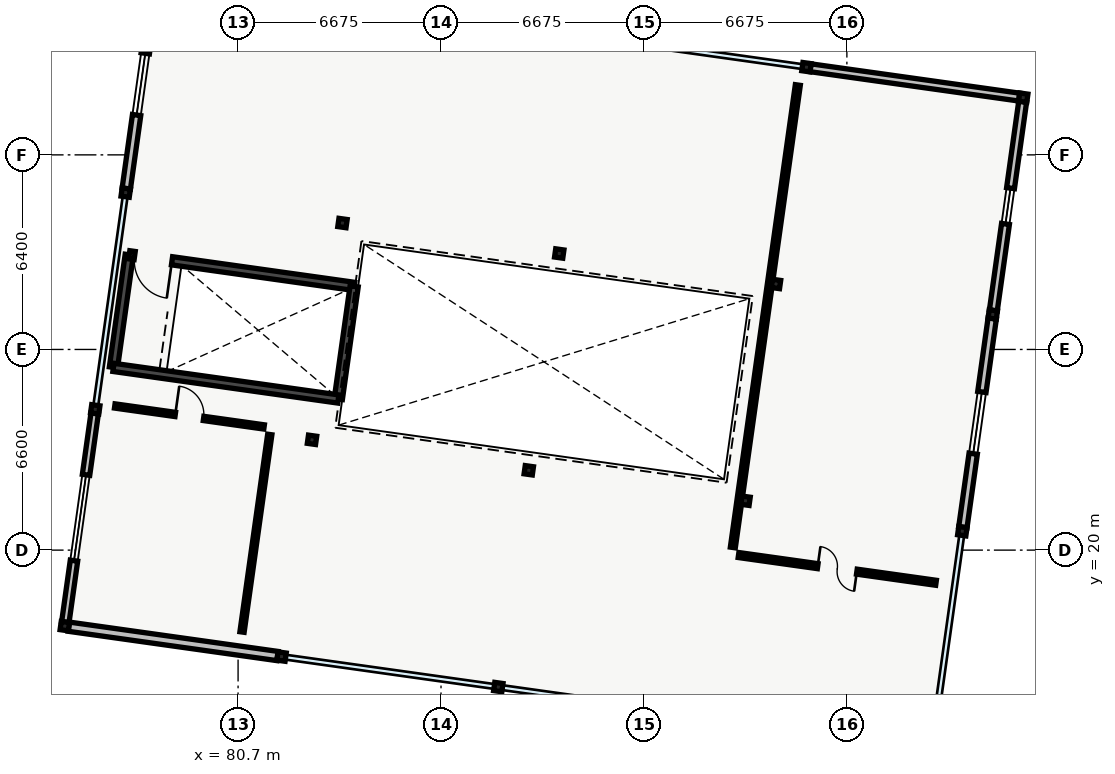
"""IFC4 building model, lengths in metres.
Left out: names, types, materials, properties, quantities, classifications, styles, units other than length and angle.
Written with IfcOpenShell. Run it as: python <this file> out.ifc"""

import sys

from ifc_helpers import new_model, si_unit, direction, frame, frame_2d, origin, origin_2d, place, context, subcontext, project, spatial, rectangle, hollow_circle, extrude, element, fill, save


model = new_model("IFC4")
c1 = context("Model", 3, precision=1e-05, world=origin(), true_north=direction((0.0, 1.0)))
c2 = subcontext(c1, "Body", "Model", "MODEL_VIEW")
j1 = project(units=[si_unit("LENGTHUNIT", "METRE"), si_unit("PLANEANGLEUNIT", "RADIAN")], contexts=[c1])
p1 = place(None, origin())
s1 = spatial("IfcSite", under=j1, at=p1, CompositionType="ELEMENT")
p2 = place(p1, origin())
s2 = spatial("IfcBuilding", under=s1, at=p2, CompositionType="ELEMENT")
p3 = place(p2, frame((0.0, 0.0, 9.6)))
s3 = spatial("IfcBuildingStorey", under=s2, at=p3, CompositionType="ELEMENT", Elevation=9.6)
for number, where, z_axis, x_axis in (
    (1, (75.0, 17.5, 0.0), (0.0, 0.0, 1.0), (0.99, -0.139, 0.0)),
    (2, (76.002, 24.63, 0.0), (0.0, 0.0, 1.0), (0.99, -0.139, 0.0)),
    (3, (77.004, 31.76, 0.0), (0.0, 0.0, 1.0), (0.99, -0.139, 0.0)),
    (4, (82.13, 16.498, 0.0), (0.0, 0.0, 1.0), (0.99, -0.139, 0.0)),
    (5, (83.132, 23.628, 0.0), (0.0, 0.0, 1.0), (0.99, -0.139, 0.0)),
    (6, (84.134, 30.758, 0.0), (0.0, 0.0, 1.0), (0.99, -0.139, 0.0)),
    (7, (89.26, 15.496, 0.0), (0.0, 0.0, 1.0), (0.99, -0.139, 0.0)),
    (8, (90.262, 22.626, 0.0), (0.0, 0.0, 1.0), (0.99, -0.139, 0.0)),
    (9, (91.264, 29.756, 0.0), (0.0, 0.0, 1.0), (0.99, -0.139, 0.0)),
    (10, (97.392, 21.624, 0.0), (0.0, 0.0, 1.0), (0.99, -0.139, 0.0)),
    (11, (98.394, 28.754, 0.0), (0.0, 0.0, 1.0), (0.99, -0.139, 0.0)),
    (12, (99.396, 35.884, 0.0), (0.0, 0.0, 1.0), (0.99, -0.139, 0.0)),
    (13, (104.522, 20.622, 0.0), (0.0, 0.0, 1.0), (0.99, -0.139, 0.0)),
    (14, (105.524, 27.752, 0.0), (0.0, 0.0, 1.0), (0.99, -0.139, 0.0)),
    (15, (106.526, 34.882, 0.0), (0.0, 0.0, 1.0), (0.99, -0.139, 0.0)),
):
    element("IfcColumn", number, at=place(p3, frame(where, z_axis=z_axis, x_axis=x_axis)), inside=s3, PredefinedType="COLUMN", context=c2, shape_type="SweptSolid", body=[
        extrude(hollow_circle(Radius=0.136, WallThickness=0.01, at=origin_2d()), origin(), (0.0, 0.0, 1.0), 4.325),
    ])
p4 = place(p3, frame((75.018, 17.63, 0.0), z_axis=(0.0, 0.0, 1.0), x_axis=(0.139154533409, 0.990270678063, 0.0)))
e16 = element("IfcWall", 16, at=p4, inside=s3, PredefinedType="STANDARD", context=c2, shape_type="SweptSolid", body=[
    extrude(rectangle(XDim=6.937, YDim=0.245, at=frame_2d((3.469, 0.0))), origin(), (0.0, 0.0, 1.0), 4.09),
])
p5 = place(p4, frame((2.043, 0.0, 0.95)))
e17 = element("IfcOpeningElement", 17, at=p5, cuts=e16, PredefinedType="OPENING", context=c2, shape_type="SweptSolid", body=[
    extrude(rectangle(XDim=2.85, YDim=1.5, at=frame_2d((1.425, 0.75))), frame((0.0, 0.123, 0.0), z_axis=(0.0, -1.0, 0.0), x_axis=(1.0, 0.0, 0.0)), (0.0, 0.0, 1.0), 0.245),
])
p6 = place(p3, frame((77.022, 31.89, 0.0), z_axis=(0.0, 0.0, 1.0), x_axis=(0.139159383244, 0.990269996544, 0.0)))
e18 = element("IfcWall", 18, at=p6, inside=s3, PredefinedType="STANDARD", context=c2, shape_type="SweptSolid", body=[
    extrude(rectangle(XDim=6.937, YDim=0.275, at=frame_2d((3.468, 0.0))), origin(), (0.0, 0.0, 1.0), 4.09),
])
p7 = place(p6, frame((2.444, 0.0, 0.95)))
e19 = element("IfcOpeningElement", 19, at=p7, cuts=e18, PredefinedType="OPENING", context=c2, shape_type="SweptSolid", body=[
    extrude(rectangle(XDim=2.05, YDim=1.7, at=frame_2d((1.025, 0.85))), frame((0.0, 0.137, 0.0), z_axis=(0.0, -1.0, 0.0), x_axis=(1.0, 0.0, 0.0)), (0.0, 0.0, 1.0), 0.275),
])
p8 = place(p3, frame((99.526, 35.865, 0.0), z_axis=(0.0, 0.0, 1.0), x_axis=(0.990270678063, -0.139154533409, 0.0)))
e20 = element("IfcWall", 20, at=p8, inside=s3, PredefinedType="STANDARD", context=c2, shape_type="SweptSolid", body=[
    extrude(rectangle(XDim=6.937, YDim=0.26, at=frame_2d((3.469, 0.0))), origin(), (0.0, 0.0, 1.0), 4.09),
])
p9 = place(p3, frame((106.508, 34.751, 0.0), z_axis=(0.0, 0.0, 1.0), x_axis=(-0.139189045029, -0.990265827818, 0.0)))
e21 = element("IfcWall", 21, at=p9, inside=s3, PredefinedType="STANDARD", context=c2, shape_type="SweptSolid", body=[
    extrude(rectangle(XDim=6.937, YDim=0.26, at=frame_2d((3.469, 0.0))), origin(), (0.0, 0.0, 1.0), 4.09),
])
p10 = place(p9, frame((2.874, 0.0, 0.95)))
e22 = element("IfcOpeningElement", 22, at=p10, cuts=e21, PredefinedType="OPENING", context=c2, shape_type="SweptSolid", body=[
    extrude(rectangle(XDim=1.19, YDim=1.38, at=frame_2d((0.595, 0.69))), frame((0.0, 0.13, 0.0), z_axis=(0.0, -1.0, 0.0), x_axis=(1.0, 0.0, 0.0)), (0.0, 0.0, 1.0), 0.26),
])
p11 = place(p3, frame((105.506, 27.621, 0.0), z_axis=(0.0, 0.0, 1.0), x_axis=(-0.139193896019, -0.990265145964, 0.0)))
e23 = element("IfcWall", 23, at=p11, inside=s3, PredefinedType="STANDARD", context=c2, shape_type="SweptSolid", body=[
    extrude(rectangle(XDim=6.937, YDim=0.275, at=frame_2d((3.469, 0.0))), origin(), (0.0, 0.0, 1.0), 4.09),
])
p12 = place(p11, frame((2.444, 0.0, 0.95)))
e24 = element("IfcOpeningElement", 24, at=p12, cuts=e23, PredefinedType="OPENING", context=c2, shape_type="SweptSolid", body=[
    extrude(rectangle(XDim=2.05, YDim=1.7, at=frame_2d((1.025, 0.85))), frame((0.0, 0.137, 0.0), z_axis=(0.0, -1.0, 0.0), x_axis=(1.0, 0.0, 0.0)), (0.0, 0.0, 1.0), 0.275),
])
p13 = place(p3, frame((82.0, 16.516, 0.0), z_axis=(0.0, 0.0, 1.0), x_axis=(-0.990270678063, 0.139154533409, 0.0)))
e25 = element("IfcWall", 25, at=p13, inside=s3, PredefinedType="STANDARD", context=c2, shape_type="SweptSolid", body=[
    extrude(rectangle(XDim=6.937, YDim=0.305, at=frame_2d((3.469, 0.0))), origin(), (0.0, 0.0, 1.0), 4.09),
])
p14 = place(p3, frame((76.6, 26.01, 0.0), z_axis=(0.0, 0.0, 1.0), x_axis=(0.139172815303, 0.990268108888, 0.0)))
e26 = element("IfcWall", 26, at=p14, inside=s3, PredefinedType="SHEAR", context=c2, shape_type="SweptSolid", body=[
    extrude(rectangle(XDim=3.74, YDim=0.27, at=frame_2d((1.87, 0.0))), origin(), (0.0, 0.0, 1.0), 4.25),
])
p15 = place(p3, frame((77.12, 29.714, 0.0), z_axis=(0.0, 0.0, 1.0), x_axis=(0.990265308789, -0.139192737628, 0.0)))
e27 = element("IfcWall", 27, at=p15, inside=s3, PredefinedType="SHEAR", context=c2, shape_type="SweptSolid", body=[
    extrude(rectangle(XDim=7.47, YDim=0.27, at=frame_2d((3.735, 0.0))), origin(), (0.0, 0.0, 1.0), 4.25),
])
p16 = place(p15, frame((0.18, 0.0, 0.0)))
e28 = element("IfcOpeningElement", 28, at=p16, cuts=e27, PredefinedType="OPENING", context=c2, shape_type="SweptSolid", body=[
    extrude(rectangle(XDim=1.24, YDim=2.15, at=frame_2d((0.62, 1.075))), frame((0.0, 0.135, 0.0), z_axis=(0.0, -1.0, 0.0), x_axis=(1.0, 0.0, 0.0)), (0.0, 0.0, 1.0), 0.27),
])
p17 = place(p3, frame((84.518, 28.674, 0.0), z_axis=(0.0, 0.0, 1.0), x_axis=(-0.139172815303, -0.990268108888, 0.0)))
e29 = element("IfcWall", 29, at=p17, inside=s3, PredefinedType="SHEAR", context=c2, shape_type="SweptSolid", body=[
    extrude(rectangle(XDim=3.74, YDim=0.27, at=frame_2d((1.87, 0.0))), origin(), (0.0, 0.0, 1.0), 4.25),
])
p18 = place(p3, frame((83.997, 24.97, 0.0), z_axis=(0.0, 0.0, 1.0), x_axis=(-0.990265308789, 0.139192737628, 0.0)))
e30 = element("IfcWall", 30, at=p18, inside=s3, PredefinedType="SHEAR", context=c2, shape_type="SweptSolid", body=[
    extrude(rectangle(XDim=7.47, YDim=0.27, at=frame_2d((3.735, 0.0))), origin(), (0.0, 0.0, 1.0), 4.25),
])
p19 = place(p3, frame((80.83, 17.307, 0.0), z_axis=(0.0, 0.0, 1.0), x_axis=(0.139185834999, 0.990266279006, 0.0)))
e31 = element("IfcWall", 31, at=p19, inside=s3, PredefinedType="PARTITIONING", context=c2, shape_type="SweptSolid", body=[
    extrude(rectangle(XDim=6.56, YDim=0.14, at=frame_2d((3.28, 0.0))), origin(), (0.0, 0.0, 1.0), 3.95),
])
p20 = place(p3, frame((81.556, 24.052, 0.0), z_axis=(0.0, 0.0, 1.0), x_axis=(-0.990271738652, 0.139146985694, 0.0)))
e32 = element("IfcWall", 32, at=p20, inside=s3, PredefinedType="PARTITIONING", context=c2, shape_type="SweptSolid", body=[
    extrude(rectangle(XDim=4.96, YDim=0.14, at=frame_2d((2.48, 0.0))), origin(), (0.0, 0.0, 1.0), 3.95),
])
p21 = place(p20, frame((2.01, 0.0, 0.0)))
e33 = element("IfcOpeningElement", 33, at=p21, cuts=e32, PredefinedType="OPENING", context=c2, shape_type="SweptSolid", body=[
    extrude(rectangle(XDim=0.94, YDim=2.12, at=frame_2d((0.47, 1.06))), frame((0.0, 0.07, 0.0), z_axis=(0.0, -1.0, 0.0), x_axis=(1.0, 0.0, 0.0)), (0.0, 0.0, 1.0), 0.14),
])
p22 = place(p3, frame((97.161, 19.839, 0.0), z_axis=(0.0, 0.0, 1.0), x_axis=(0.990265558002, -0.139190964632, 0.0)))
e34 = element("IfcWall", 34, at=p22, inside=s3, PredefinedType="PARTITIONING", context=c2, shape_type="SweptSolid", body=[
    extrude(rectangle(XDim=6.56, YDim=0.165, at=frame_2d((3.28, 0.0))), origin(), (0.0, 0.0, 1.0), 3.95),
])
p23 = place(p22, frame((2.63, 0.0, 0.0)))
e35 = element("IfcOpeningElement", 35, at=p23, cuts=e34, PredefinedType="OPENING", context=c2, shape_type="SweptSolid", body=[
    extrude(rectangle(XDim=1.3, YDim=2.18, at=frame_2d((0.65, 1.09))), frame((0.0, 0.083, 0.0), z_axis=(0.0, -1.0, 0.0), x_axis=(1.0, 0.0, 0.0)), (0.0, 0.0, 1.0), 0.165),
])
p24 = place(p3, frame((99.112, 35.298, 0.0), z_axis=(0.0, 0.0, 1.0), x_axis=(-0.139171298776, -0.99026832202, 0.0)))
e36 = element("IfcWall", 36, at=p24, inside=s3, PredefinedType="PARTITIONING", context=c2, shape_type="SweptSolid", body=[
    extrude(rectangle(XDim=15.36, YDim=0.165, at=frame_2d((7.68, 0.0))), origin(), (0.0, 0.0, 1.0), 3.95),
])
p25 = place(p5, origin())
e37 = element("IfcWindow", 37, at=p25, inside=s3, PartitioningType="SINGLE_PANEL", PredefinedType="WINDOW", context=c2, shape_type="SweptSolid", body=[
    extrude(rectangle(XDim=2.85, YDim=1.5, at=frame_2d((1.425, 0.75))), frame((0.0, 0.03, 0.0), z_axis=(0.0, -1.0, 0.0), x_axis=(1.0, 0.0, 0.0)), (0.0, 0.0, 1.0), 0.06),
])
fill(e17, e37)
p26 = place(p7, origin())
e38 = element("IfcWindow", 38, at=p26, inside=s3, PartitioningType="SINGLE_PANEL", PredefinedType="WINDOW", context=c2, shape_type="SweptSolid", body=[
    extrude(rectangle(XDim=2.05, YDim=1.7, at=frame_2d((1.025, 0.85))), frame((0.0, 0.03, 0.0), z_axis=(0.0, -1.0, 0.0), x_axis=(1.0, 0.0, 0.0)), (0.0, 0.0, 1.0), 0.06),
])
fill(e19, e38)
p27 = place(p10, origin())
e39 = element("IfcWindow", 39, at=p27, inside=s3, PartitioningType="SINGLE_PANEL", PredefinedType="WINDOW", context=c2, shape_type="SweptSolid", body=[
    extrude(rectangle(XDim=1.19, YDim=1.38, at=frame_2d((0.595, 0.69))), frame((0.0, 0.03, 0.0), z_axis=(0.0, -1.0, 0.0), x_axis=(1.0, 0.0, 0.0)), (0.0, 0.0, 1.0), 0.06),
])
fill(e22, e39)
p28 = place(p12, origin())
e40 = element("IfcWindow", 40, at=p28, inside=s3, PartitioningType="SINGLE_PANEL", PredefinedType="WINDOW", context=c2, shape_type="SweptSolid", body=[
    extrude(rectangle(XDim=2.05, YDim=1.7, at=frame_2d((1.025, 0.85))), frame((0.0, 0.03, 0.0), z_axis=(0.0, -1.0, 0.0), x_axis=(1.0, 0.0, 0.0)), (0.0, 0.0, 1.0), 0.06),
])
fill(e24, e40)
p29 = place(p16, origin())
e41 = element("IfcDoor", 41, at=p29, inside=s3, OperationType="SINGLE_SWING_RIGHT", PredefinedType="DOOR", context=c2, shape_type="SweptSolid", body=[
    extrude(rectangle(XDim=1.24, YDim=2.15, at=frame_2d((0.62, 1.075))), frame((0.0, 0.025, 0.0), z_axis=(0.0, -1.0, 0.0), x_axis=(1.0, 0.0, 0.0)), (0.0, 0.0, 1.0), 0.05),
])
fill(e28, e41)
p30 = place(p21, origin())
e42 = element("IfcDoor", 42, at=p30, inside=s3, OperationType="SINGLE_SWING_RIGHT", PredefinedType="DOOR", context=c2, shape_type="SweptSolid", body=[
    extrude(rectangle(XDim=0.94, YDim=2.12, at=frame_2d((0.47, 1.06))), frame((0.0, 0.025, 0.0), z_axis=(0.0, -1.0, 0.0), x_axis=(1.0, 0.0, 0.0)), (0.0, 0.0, 1.0), 0.05),
])
fill(e33, e42)
p31 = place(p23, origin())
e43 = element("IfcDoor", 43, at=p31, inside=s3, OperationType="DOUBLE_DOOR_SINGLE_SWING", PredefinedType="DOOR", context=c2, shape_type="SweptSolid", body=[
    extrude(rectangle(XDim=1.3, YDim=2.18, at=frame_2d((0.65, 1.09))), frame((0.0, 0.025, 0.0), z_axis=(0.0, -1.0, 0.0), x_axis=(1.0, 0.0, 0.0)), (0.0, 0.0, 1.0), 0.05),
])
fill(e35, e43)
save(model, sys.argv[1])
